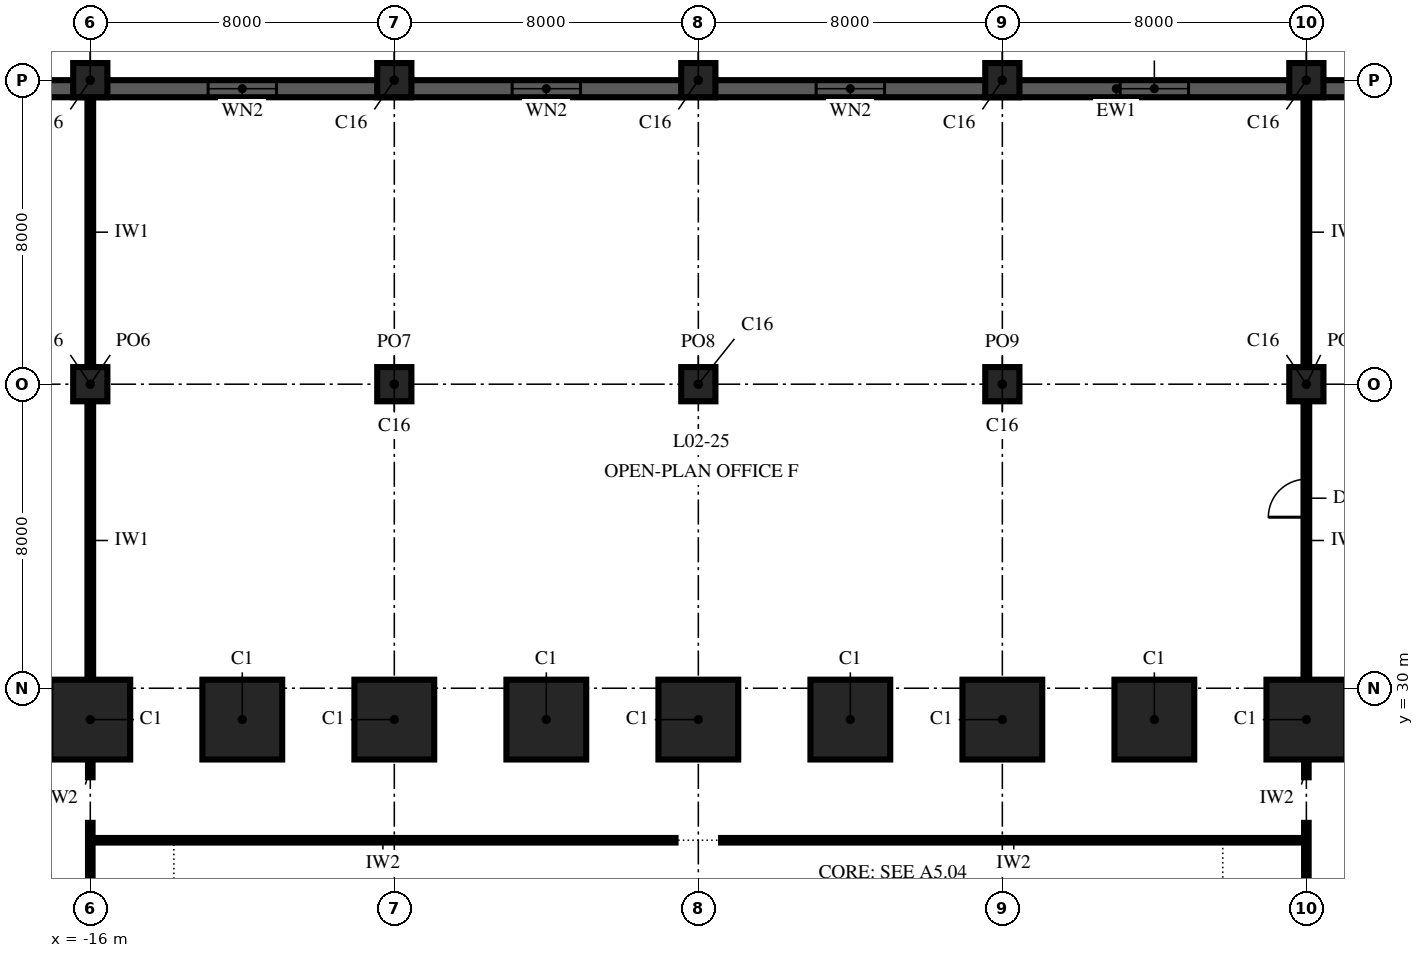
"""IFC4 building model, lengths in metres.
Left out: names, types, materials, properties, quantities, classifications, styles, units other than length and angle.
Written with IfcOpenShell. Run it as: python <this file> out.ifc"""

import sys

from ifc_helpers import new_model, si_unit, direction, frame, frame_2d, origin, origin_2d, place, context, subcontext, project, spatial, rectangle, extrude, element, fill, save


model = new_model("IFC4")
c1 = context("Model", 3, precision=1e-05, world=origin(), true_north=direction((0.0, 1.0)))
c2 = subcontext(c1, "Body", "Model", "MODEL_VIEW")
j1 = project(units=[si_unit("LENGTHUNIT", "METRE"), si_unit("PLANEANGLEUNIT", "RADIAN")], contexts=[c1])
p1 = place(None, origin())
s1 = spatial("IfcSite", under=j1, at=p1, CompositionType="ELEMENT")
p2 = place(p1, origin())
s2 = spatial("IfcBuilding", under=s1, at=p2, CompositionType="ELEMENT")
p3 = place(p2, frame((0.0, 0.0, 12.0)))
s3 = spatial("IfcBuildingStorey", under=s2, at=p3, CompositionType="ELEMENT", Elevation=12.0)
for number, where, z_axis, x_axis in (
    (1, (16.0, 29.175, 0.0), (0.0, 0.0, 1.0), (-1.0, 0.0, 0.0)),
    (2, (12.0, 29.175, 0.0), (0.0, 0.0, 1.0), (-1.0, 0.0, 0.0)),
    (3, (8.0, 29.175, 0.0), (0.0, 0.0, 1.0), (-1.0, 0.0, 0.0)),
    (4, (4.0, 29.175, 0.0), (0.0, 0.0, 1.0), (-1.0, 0.0, 0.0)),
    (5, (0.0, 29.175, 0.0), (0.0, 0.0, 1.0), (-1.0, 0.0, 0.0)),
    (6, (-4.0, 29.175, 0.0), (0.0, 0.0, 1.0), (-1.0, 0.0, 0.0)),
    (7, (-8.0, 29.175, 0.0), (0.0, 0.0, 1.0), (-1.0, 0.0, 0.0)),
    (8, (-12.0, 29.175, 0.0), (0.0, 0.0, 1.0), (-1.0, 0.0, 0.0)),
    (9, (-16.0, 29.175, 0.0), (0.0, 0.0, 1.0), (-1.0, 0.0, 0.0)),
):
    element("IfcColumn", number, at=place(p3, frame(where, z_axis=z_axis, x_axis=x_axis)), inside=s3, PredefinedType="COLUMN", context=c2, shape_type="SweptSolid", body=[
        extrude(rectangle(XDim=2.1, YDim=2.1, at=origin_2d()), origin(), (0.0, 0.0, 1.0), 7.0),
    ])
for number, where, z_axis, x_axis in (
    (10, (-16.0, 38.0, 0.0), (0.0, 0.0, 1.0), (1.0, 0.0, 0.0)),
    (11, (-16.0, 46.0, 0.0), (0.0, 0.0, 1.0), (1.0, 0.0, 0.0)),
    (12, (-8.0, 38.0, 0.0), (0.0, 0.0, 1.0), (1.0, 0.0, 0.0)),
    (13, (-8.0, 46.0, 0.0), (0.0, 0.0, 1.0), (1.0, 0.0, 0.0)),
    (14, (0.0, 38.0, 0.0), (0.0, 0.0, 1.0), (1.0, 0.0, 0.0)),
    (15, (0.0, 46.0, 0.0), (0.0, 0.0, 1.0), (1.0, 0.0, 0.0)),
    (16, (8.0, 38.0, 0.0), (0.0, 0.0, 1.0), (1.0, 0.0, 0.0)),
    (17, (8.0, 46.0, 0.0), (0.0, 0.0, 1.0), (1.0, 0.0, 0.0)),
    (18, (16.0, 38.0, 0.0), (0.0, 0.0, 1.0), (1.0, 0.0, 0.0)),
    (19, (16.0, 46.0, 0.0), (0.0, 0.0, 1.0), (1.0, 0.0, 0.0)),
):
    element("IfcColumn", number, at=place(p3, frame(where, z_axis=z_axis, x_axis=x_axis)), inside=s3, PredefinedType="COLUMN", context=c2, shape_type="SweptSolid", body=[
        extrude(rectangle(XDim=0.9, YDim=0.9, at=origin_2d()), origin(), (0.0, 0.0, 1.0), 7.0),
    ])
p4 = place(p3, frame((56.0, 45.775, 0.0), z_axis=(0.0, 0.0, 1.0), x_axis=(-1.0, 0.0, 0.0)))
e20 = element("IfcWall", 20, at=p4, inside=s3, PredefinedType="SOLIDWALL", context=c2, shape_type="SweptSolid", body=[
    extrude(rectangle(XDim=90.0, YDim=0.45, at=frame_2d((45.0, 0.0))), origin(), (0.0, 0.0, 1.0), 7.0),
])
p5 = place(p4, frame((3.1, 0.0, 1.0)))
e21 = element("IfcOpeningElement", 21, at=p5, cuts=e20, PredefinedType="OPENING", context=c2, shape_type="SweptSolid", body=[
    extrude(rectangle(XDim=1.8, YDim=3.0, at=frame_2d((0.9, 1.5))), frame((0.0, 0.24, 0.0), z_axis=(0.0, -1.0, 0.0), x_axis=(1.0, 0.0, 0.0)), (0.0, 0.0, 1.0), 0.48),
])
p6 = place(p4, frame((11.1, 0.0, 1.0)))
e22 = element("IfcOpeningElement", 22, at=p6, cuts=e20, PredefinedType="OPENING", context=c2, shape_type="SweptSolid", body=[
    extrude(rectangle(XDim=1.8, YDim=3.0, at=frame_2d((0.9, 1.5))), frame((0.0, 0.24, 0.0), z_axis=(0.0, -1.0, 0.0), x_axis=(1.0, 0.0, 0.0)), (0.0, 0.0, 1.0), 0.48),
])
p7 = place(p4, frame((19.1, 0.0, 1.0)))
e23 = element("IfcOpeningElement", 23, at=p7, cuts=e20, PredefinedType="OPENING", context=c2, shape_type="SweptSolid", body=[
    extrude(rectangle(XDim=1.8, YDim=3.0, at=frame_2d((0.9, 1.5))), frame((0.0, 0.24, 0.0), z_axis=(0.0, -1.0, 0.0), x_axis=(1.0, 0.0, 0.0)), (0.0, 0.0, 1.0), 0.48),
])
p8 = place(p4, frame((27.1, 0.0, 1.0)))
e24 = element("IfcOpeningElement", 24, at=p8, cuts=e20, PredefinedType="OPENING", context=c2, shape_type="SweptSolid", body=[
    extrude(rectangle(XDim=1.8, YDim=3.0, at=frame_2d((0.9, 1.5))), frame((0.0, 0.24, 0.0), z_axis=(0.0, -1.0, 0.0), x_axis=(1.0, 0.0, 0.0)), (0.0, 0.0, 1.0), 0.48),
])
p9 = place(p4, frame((34.9, 0.0, 1.0)))
e25 = element("IfcOpeningElement", 25, at=p9, cuts=e20, PredefinedType="OPENING", context=c2, shape_type="SweptSolid", body=[
    extrude(rectangle(XDim=0.9, YDim=3.0, at=frame_2d((0.45, 1.5))), frame((0.0, 0.24, 0.0), z_axis=(0.0, -1.0, 0.0), x_axis=(1.0, 0.0, 0.0)), (0.0, 0.0, 1.0), 0.48),
])
p10 = place(p4, frame((36.2, 0.0, 1.0)))
e26 = element("IfcOpeningElement", 26, at=p10, cuts=e20, PredefinedType="OPENING", context=c2, shape_type="SweptSolid", body=[
    extrude(rectangle(XDim=0.9, YDim=3.0, at=frame_2d((0.45, 1.5))), frame((0.0, 0.24, 0.0), z_axis=(0.0, -1.0, 0.0), x_axis=(1.0, 0.0, 0.0)), (0.0, 0.0, 1.0), 0.48),
])
p11 = place(p4, frame((43.1, 0.0, 1.0)))
e27 = element("IfcOpeningElement", 27, at=p11, cuts=e20, PredefinedType="OPENING", context=c2, shape_type="SweptSolid", body=[
    extrude(rectangle(XDim=1.8, YDim=3.0, at=frame_2d((0.9, 1.5))), frame((0.0, 0.24, 0.0), z_axis=(0.0, -1.0, 0.0), x_axis=(1.0, 0.0, 0.0)), (0.0, 0.0, 1.0), 0.48),
])
p12 = place(p4, frame((51.1, 0.0, 1.0)))
e28 = element("IfcOpeningElement", 28, at=p12, cuts=e20, PredefinedType="OPENING", context=c2, shape_type="SweptSolid", body=[
    extrude(rectangle(XDim=1.8, YDim=3.0, at=frame_2d((0.9, 1.5))), frame((0.0, 0.24, 0.0), z_axis=(0.0, -1.0, 0.0), x_axis=(1.0, 0.0, 0.0)), (0.0, 0.0, 1.0), 0.48),
])
p13 = place(p4, frame((59.1, 0.0, 1.0)))
e29 = element("IfcOpeningElement", 29, at=p13, cuts=e20, PredefinedType="OPENING", context=c2, shape_type="SweptSolid", body=[
    extrude(rectangle(XDim=1.8, YDim=3.0, at=frame_2d((0.9, 1.5))), frame((0.0, 0.24, 0.0), z_axis=(0.0, -1.0, 0.0), x_axis=(1.0, 0.0, 0.0)), (0.0, 0.0, 1.0), 0.48),
])
p14 = place(p4, frame((67.1, 0.0, 1.0)))
e30 = element("IfcOpeningElement", 30, at=p14, cuts=e20, PredefinedType="OPENING", context=c2, shape_type="SweptSolid", body=[
    extrude(rectangle(XDim=1.8, YDim=3.0, at=frame_2d((0.9, 1.5))), frame((0.0, 0.24, 0.0), z_axis=(0.0, -1.0, 0.0), x_axis=(1.0, 0.0, 0.0)), (0.0, 0.0, 1.0), 0.48),
])
p15 = place(p4, frame((75.1, 0.0, 1.0)))
e31 = element("IfcOpeningElement", 31, at=p15, cuts=e20, PredefinedType="OPENING", context=c2, shape_type="SweptSolid", body=[
    extrude(rectangle(XDim=1.8, YDim=3.0, at=frame_2d((0.9, 1.5))), frame((0.0, 0.24, 0.0), z_axis=(0.0, -1.0, 0.0), x_axis=(1.0, 0.0, 0.0)), (0.0, 0.0, 1.0), 0.48),
])
p16 = place(p4, frame((83.1, 0.0, 1.0)))
e32 = element("IfcOpeningElement", 32, at=p16, cuts=e20, PredefinedType="OPENING", context=c2, shape_type="SweptSolid", body=[
    extrude(rectangle(XDim=1.8, YDim=3.0, at=frame_2d((0.9, 1.5))), frame((0.0, 0.24, 0.0), z_axis=(0.0, -1.0, 0.0), x_axis=(1.0, 0.0, 0.0)), (0.0, 0.0, 1.0), 0.48),
])
p17 = place(p3, frame((-16.0, 22.46, 0.0), z_axis=(0.0, 0.0, 1.0), x_axis=(0.0, 1.0, 0.0)))
e33 = element("IfcWall", 33, at=p17, inside=s3, PredefinedType="PARTITIONING", context=c2, shape_type="SweptSolid", body=[
    extrude(rectangle(XDim=3.998, YDim=0.12, at=frame_2d((1.999, 0.0))), origin(), (0.0, 0.0, 1.0), 6.7),
])
p18 = place(p3, frame((-16.0, 27.657, 0.0), z_axis=(0.0, 0.0, 1.0), x_axis=(0.0, 1.0, 0.0)))
e34 = element("IfcWall", 34, at=p18, inside=s3, PredefinedType="PARTITIONING", context=c2, shape_type="SweptSolid", body=[
    extrude(rectangle(XDim=0.458, YDim=0.12, at=frame_2d((0.229, 0.0))), origin(), (0.0, 0.0, 1.0), 6.7),
])
p19 = place(p3, frame((-16.0, 30.235, 0.0), z_axis=(0.0, 0.0, 1.0), x_axis=(0.0, 1.0, 0.0)))
e35 = element("IfcWall", 35, at=p19, inside=s3, PredefinedType="PARTITIONING", context=c2, shape_type="SweptSolid", body=[
    extrude(rectangle(XDim=7.305, YDim=0.15, at=frame_2d((3.652, 0.0))), origin(), (0.0, 0.0, 1.0), 6.7),
])
p20 = place(p3, frame((-16.0, 38.46, 0.0), z_axis=(0.0, 0.0, 1.0), x_axis=(0.0, 1.0, 0.0)))
e36 = element("IfcWall", 36, at=p20, inside=s3, PredefinedType="PARTITIONING", context=c2, shape_type="SweptSolid", body=[
    extrude(rectangle(XDim=7.08, YDim=0.15, at=frame_2d((3.54, 0.0))), origin(), (0.0, 0.0, 1.0), 6.05),
])
p21 = place(p3, frame((16.0, 22.46, 0.0), z_axis=(0.0, 0.0, 1.0), x_axis=(0.0, 1.0, 0.0)))
e37 = element("IfcWall", 37, at=p21, inside=s3, PredefinedType="PARTITIONING", context=c2, shape_type="SweptSolid", body=[
    extrude(rectangle(XDim=3.998, YDim=0.12, at=frame_2d((1.999, 0.0))), origin(), (0.0, 0.0, 1.0), 6.7),
])
p22 = place(p3, frame((16.0, 27.657, 0.0), z_axis=(0.0, 0.0, 1.0), x_axis=(0.0, 1.0, 0.0)))
e38 = element("IfcWall", 38, at=p22, inside=s3, PredefinedType="PARTITIONING", context=c2, shape_type="SweptSolid", body=[
    extrude(rectangle(XDim=0.458, YDim=0.12, at=frame_2d((0.229, 0.0))), origin(), (0.0, 0.0, 1.0), 6.7),
])
p23 = place(p3, frame((16.0, 30.235, 0.0), z_axis=(0.0, 0.0, 1.0), x_axis=(0.0, 1.0, 0.0)))
e39 = element("IfcWall", 39, at=p23, inside=s3, PredefinedType="PARTITIONING", context=c2, shape_type="SweptSolid", body=[
    extrude(rectangle(XDim=7.305, YDim=0.15, at=frame_2d((3.652, 0.0))), origin(), (0.0, 0.0, 1.0), 6.7),
])
p24 = place(p23, frame((4.265, 0.0, 0.0)))
e40 = element("IfcOpeningElement", 40, at=p24, cuts=e39, PredefinedType="OPENING", context=c2, shape_type="SweptSolid", body=[
    extrude(rectangle(XDim=1.0, YDim=2.1, at=frame_2d((0.5, 1.05))), frame((0.0, 0.09, 0.0), z_axis=(0.0, -1.0, 0.0), x_axis=(1.0, 0.0, 0.0)), (0.0, 0.0, 1.0), 0.18),
])
p25 = place(p3, frame((16.0, 38.46, 0.0), z_axis=(0.0, 0.0, 1.0), x_axis=(0.0, 1.0, 0.0)))
e41 = element("IfcWall", 41, at=p25, inside=s3, PredefinedType="PARTITIONING", context=c2, shape_type="SweptSolid", body=[
    extrude(rectangle(XDim=7.08, YDim=0.15, at=frame_2d((3.54, 0.0))), origin(), (0.0, 0.0, 1.0), 6.05),
])
for number, where, z_axis, x_axis in (
    (42, (-16.0, 26.0, 0.0), (0.0, 0.0, 1.0), (1.0, 0.0, 0.0)),
    (43, (0.6, 26.0, 0.0), (0.0, 0.0, 1.0), (1.0, 0.0, 0.0)),
):
    element("IfcWall", number, at=place(p3, frame(where, z_axis=z_axis, x_axis=x_axis)), inside=s3, PredefinedType="PARTITIONING", context=c2, shape_type="SweptSolid", body=[
        extrude(rectangle(XDim=15.4, YDim=0.12, at=frame_2d((7.7, 0.0))), origin(), (0.0, 0.0, 1.0), 6.7),
    ])
p26 = place(p11, origin())
e44 = element("IfcWindow", 44, at=p26, inside=s3, PartitioningType="SINGLE_PANEL", PredefinedType="WINDOW", context=c2, shape_type="SweptSolid", body=[
    extrude(rectangle(XDim=1.8, YDim=3.0, at=frame_2d((0.9, 1.5))), frame((0.0, 0.03, 0.0), z_axis=(0.0, -1.0, 0.0), x_axis=(1.0, 0.0, 0.0)), (0.0, 0.0, 1.0), 0.06),
])
fill(e27, e44)
p27 = place(p12, origin())
e45 = element("IfcWindow", 45, at=p27, inside=s3, PartitioningType="SINGLE_PANEL", PredefinedType="WINDOW", context=c2, shape_type="SweptSolid", body=[
    extrude(rectangle(XDim=1.8, YDim=3.0, at=frame_2d((0.9, 1.5))), frame((0.0, 0.03, 0.0), z_axis=(0.0, -1.0, 0.0), x_axis=(1.0, 0.0, 0.0)), (0.0, 0.0, 1.0), 0.06),
])
fill(e28, e45)
p28 = place(p13, origin())
e46 = element("IfcWindow", 46, at=p28, inside=s3, PartitioningType="SINGLE_PANEL", PredefinedType="WINDOW", context=c2, shape_type="SweptSolid", body=[
    extrude(rectangle(XDim=1.8, YDim=3.0, at=frame_2d((0.9, 1.5))), frame((0.0, 0.03, 0.0), z_axis=(0.0, -1.0, 0.0), x_axis=(1.0, 0.0, 0.0)), (0.0, 0.0, 1.0), 0.06),
])
fill(e29, e46)
p29 = place(p14, origin())
e47 = element("IfcWindow", 47, at=p29, inside=s3, PartitioningType="SINGLE_PANEL", PredefinedType="WINDOW", context=c2, shape_type="SweptSolid", body=[
    extrude(rectangle(XDim=1.8, YDim=3.0, at=frame_2d((0.9, 1.5))), frame((0.0, 0.03, 0.0), z_axis=(0.0, -1.0, 0.0), x_axis=(1.0, 0.0, 0.0)), (0.0, 0.0, 1.0), 0.06),
])
fill(e30, e47)
p30 = place(p24, origin())
e48 = element("IfcDoor", 48, at=p30, inside=s3, OperationType="SINGLE_SWING_LEFT", PredefinedType="DOOR", context=c2, shape_type="SweptSolid", body=[
    extrude(rectangle(XDim=1.0, YDim=2.1, at=frame_2d((0.5, 1.05))), frame((0.0, 0.075, 0.0), z_axis=(0.0, -1.0, 0.0), x_axis=(1.0, 0.0, 0.0)), (0.0, 0.0, 1.0), 0.149),
])
fill(e40, e48)
save(model, sys.argv[1])
